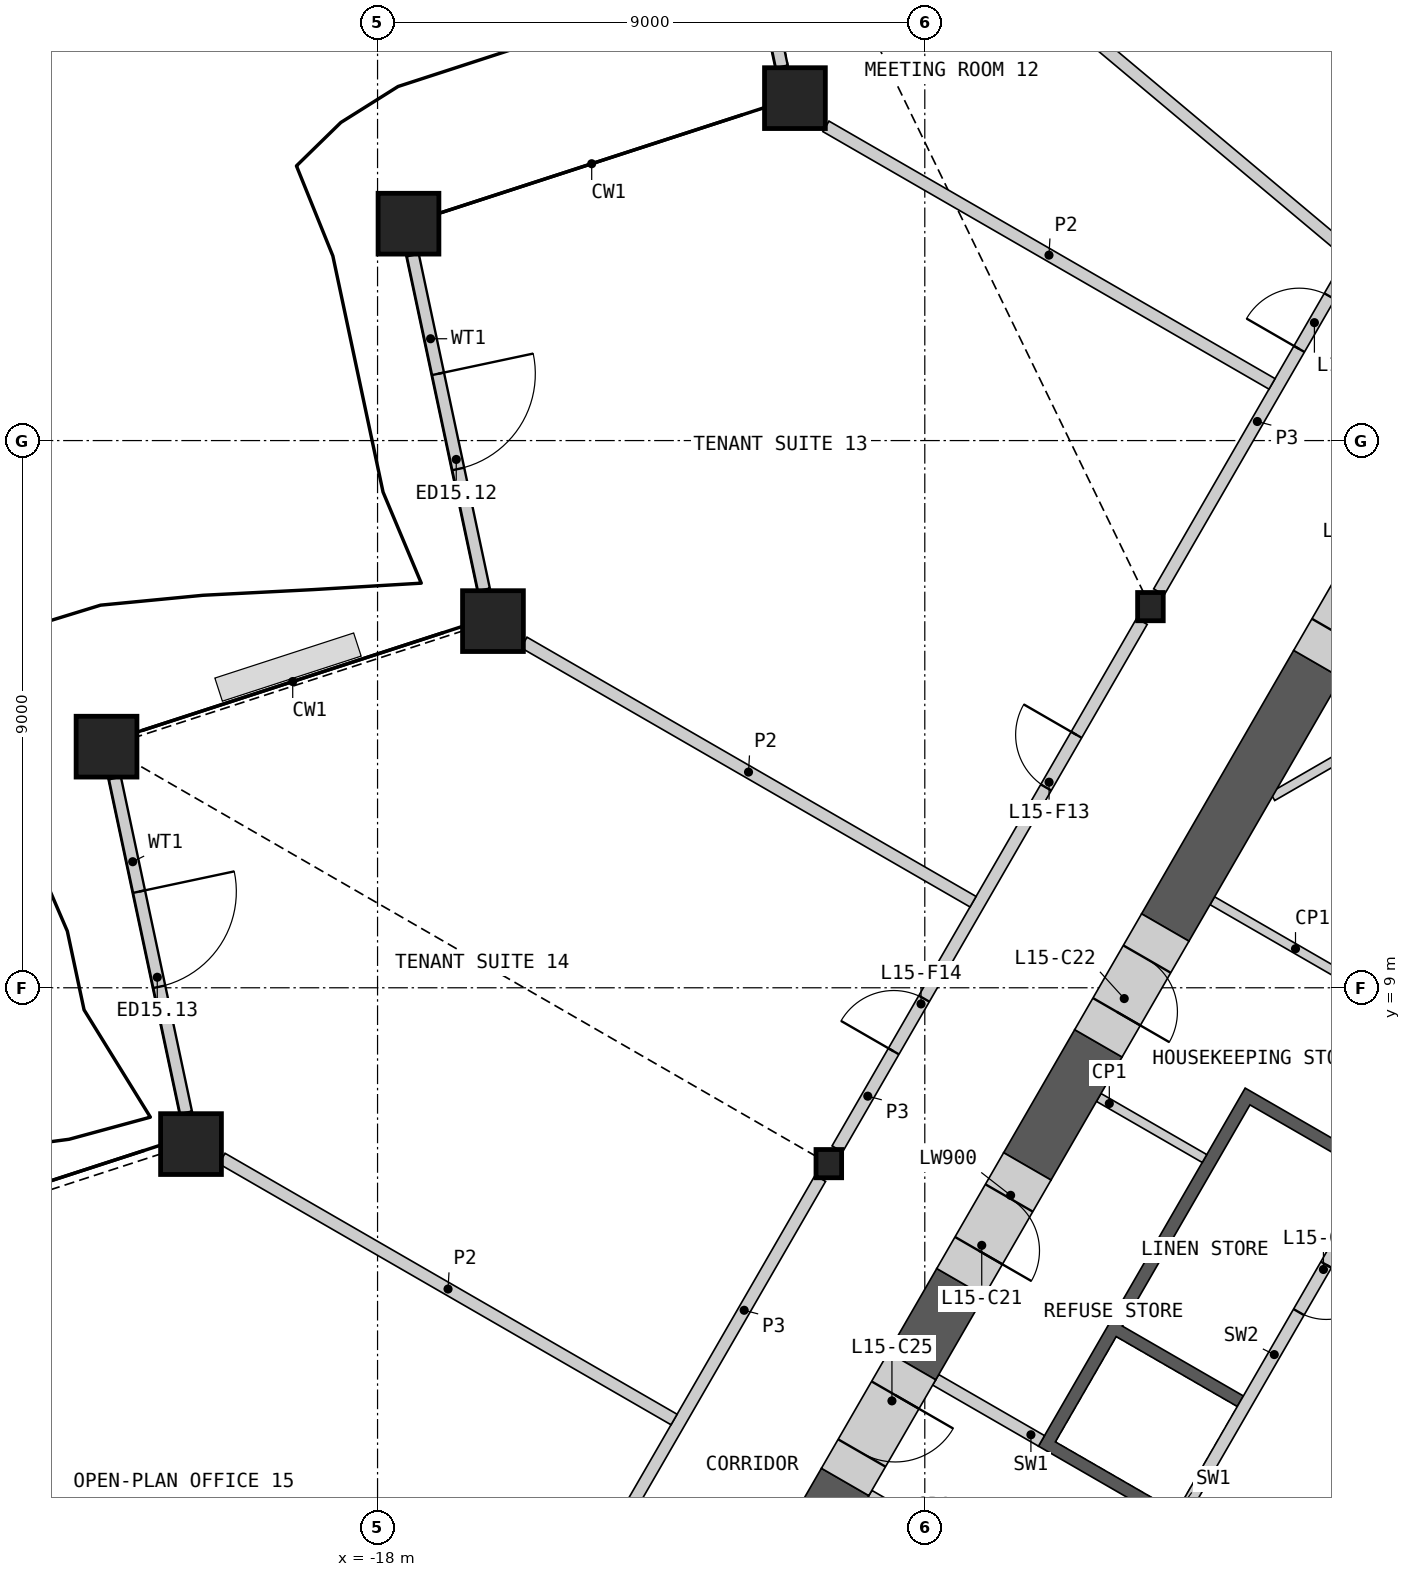
"""IFC4 building model, lengths in metres.
Left out: names, types, materials, properties, quantities, classifications, styles, units other than length and angle.
Written with IfcOpenShell. Run it as: python <this file> out.ifc"""

import sys

from ifc_helpers import new_model, si_unit, direction, frame, frame_2d, origin, origin_2d, place, context, subcontext, project, spatial, polyline, rectangle, hollow_rectangle, i_section, outline, extrude, element, fill, save


model = new_model("IFC4")
c1 = context("Model", 3, precision=1e-05, world=origin(), true_north=direction((0.0, 1.0)))
c2 = subcontext(c1, "Body", "Model", "MODEL_VIEW")
j1 = project(units=[si_unit("LENGTHUNIT", "METRE"), si_unit("PLANEANGLEUNIT", "RADIAN")], contexts=[c1])
p1 = place(None, origin())
s1 = spatial("IfcSite", under=j1, at=p1, CompositionType="ELEMENT")
p2 = place(p1, origin())
s2 = spatial("IfcBuilding", under=s1, at=p2, CompositionType="ELEMENT")
p3 = place(p2, frame((0.0, 0.0, 72.0)))
s3 = spatial("IfcBuildingStorey", under=s2, at=p3, CompositionType="ELEMENT", Elevation=72.0)
for number, where, z_axis, x_axis in (
    (1, (-11.136, 23.632, 0.0), (0.0, 0.0, 1.0), (1.0, 0.0, 0.0)),
    (2, (-17.491, 21.567, 0.0), (0.0, 0.0, 1.0), (1.0, 0.0, 0.0)),
    (3, (-16.102, 15.031, 0.0), (0.0, 0.0, 1.0), (1.0, 0.0, 0.0)),
    (4, (-22.457, 12.966, 0.0), (0.0, 0.0, 1.0), (1.0, 0.0, 0.0)),
    (5, (-21.068, 6.429, 0.0), (0.0, 0.0, 1.0), (1.0, 0.0, 0.0)),
):
    element("IfcColumn", number, at=place(p3, frame(where, z_axis=z_axis, x_axis=x_axis)), inside=s3, PredefinedType="COLUMN", context=c2, shape_type="SweptSolid", body=[
        extrude(hollow_rectangle(XDim=1.0, YDim=1.0, WallThickness=0.07, at=origin_2d()), origin(), (0.0, 0.0, 1.0), 4.2),
    ])
for number, where, z_axis, x_axis in (
    (6, (-5.289, 15.269, 0.0), (0.0, 0.0, 1.0), (1.0, 0.0, 0.0)),
    (7, (-10.578, 6.107, 0.0), (0.0, 0.0, 1.0), (1.0, 0.0, 0.0)),
):
    element("IfcColumn", number, at=place(p3, frame(where, z_axis=z_axis, x_axis=x_axis)), inside=s3, PredefinedType="COLUMN", context=c2, shape_type="SweptSolid", body=[
        extrude(i_section(OverallWidth=0.421, OverallDepth=0.465, WebThickness=0.045, FlangeThickness=0.072, at=origin_2d()), origin(), (0.0, 0.0, 1.0), 4.2),
    ])
p4 = place(p3, frame((-12.521, 29.652, 0.0), z_axis=(0.0, 0.0, 1.0), x_axis=(0.207901831982, -0.978149696242, 0.0)))
e8 = element("IfcWall", 8, at=p4, inside=s3, PredefinedType="SOLIDWALL", context=c2, shape_type="SweptSolid", body=[
    extrude(rectangle(XDim=5.626, YDim=0.2, at=frame_2d((2.813, 0.0))), origin(), (0.0, 0.0, 1.0), 3.189),
])
p5 = place(p4, frame((2.083, 0.0, 0.0)))
e9 = element("IfcOpeningElement", 9, at=p5, cuts=e8, PredefinedType="OPENING", context=c2, shape_type="SweptSolid", body=[
    extrude(rectangle(XDim=1.6, YDim=2.4, at=frame_2d((0.8, 1.2))), frame((0.0, 0.11, 0.0), z_axis=(0.0, -1.0, 0.0), x_axis=(1.0, 0.0, 0.0)), (0.0, 0.0, 1.0), 0.22),
])
p6 = place(p3, frame((-17.42, 21.051, 0.0), z_axis=(0.0, 0.0, 1.0), x_axis=(0.207901831982, -0.978149696242, 0.0)))
e10 = element("IfcWall", 10, at=p6, inside=s3, PredefinedType="SOLIDWALL", context=c2, shape_type="SweptSolid", body=[
    extrude(rectangle(XDim=5.626, YDim=0.2, at=frame_2d((2.813, 0.0))), origin(), (0.0, 0.0, 1.0), 3.189),
])
p7 = place(p6, frame((1.996, 0.0, 0.0)))
e11 = element("IfcOpeningElement", 11, at=p7, cuts=e10, PredefinedType="OPENING", context=c2, shape_type="SweptSolid", body=[
    extrude(rectangle(XDim=1.6, YDim=2.4, at=frame_2d((0.8, 1.2))), frame((0.0, 0.11, 0.0), z_axis=(0.0, -1.0, 0.0), x_axis=(1.0, 0.0, 0.0)), (0.0, 0.0, 1.0), 0.22),
])
p8 = place(p3, frame((-22.319, 12.449, 0.0), z_axis=(0.0, 0.0, 1.0), x_axis=(0.207901831982, -0.978149696242, 0.0)))
e12 = element("IfcWall", 12, at=p8, inside=s3, PredefinedType="SOLIDWALL", context=c2, shape_type="SweptSolid", body=[
    extrude(rectangle(XDim=5.626, YDim=0.2, at=frame_2d((2.813, 0.0))), origin(), (0.0, 0.0, 1.0), 3.189),
])
p9 = place(p8, frame((1.909, 0.0, 0.0)))
e13 = element("IfcOpeningElement", 13, at=p9, cuts=e12, PredefinedType="OPENING", context=c2, shape_type="SweptSolid", body=[
    extrude(rectangle(XDim=1.6, YDim=2.4, at=frame_2d((0.8, 1.2))), frame((0.0, 0.11, 0.0), z_axis=(0.0, -1.0, 0.0), x_axis=(1.0, 0.0, 0.0)), (0.0, 0.0, 1.0), 0.22),
])
p10 = place(p3, origin())
e14 = element("IfcWall", 14, at=p10, inside=s3, PredefinedType="SHEAR", context=c2, shape_type="SweptSolid", body=[
    extrude(outline(polyline([(-4.96, 0.208), (-7.131, 1.461), (-3.731, 7.35), (-1.561, 6.097), (-1.66, 5.924), (-3.652, 7.074), (-5.752, 3.437), (-3.76, 2.287), (-3.861, 2.113), (-5.852, 3.263), (-6.852, 1.531), (-4.861, 0.381), (-4.96, 0.208)])), origin(), (0.0, 0.0, 1.0), 3.8),
])
p11 = place(p3, frame((-1.631, 5.776, 0.0), z_axis=(0.0, 0.0, 1.0), x_axis=(-0.499992876559, -0.866029516466, 0.0)))
e15 = element("IfcWall", 15, at=p11, inside=s3, PredefinedType="SOLIDWALL", context=c2, shape_type="SweptSolid", body=[
    extrude(rectangle(XDim=6.486, YDim=0.2, at=frame_2d((3.243, 0.0))), origin(), (0.0, 0.0, 1.0), 3.8),
])
p12 = place(p11, frame((1.537, 0.0, 0.0)))
e16 = element("IfcOpeningElement", 16, at=p12, cuts=e15, PredefinedType="OPENING", context=c2, shape_type="SweptSolid", body=[
    extrude(rectangle(XDim=0.9, YDim=2.1, at=frame_2d((0.45, 1.05))), frame((0.0, 0.11, 0.0), z_axis=(0.0, -1.0, 0.0), x_axis=(1.0, 0.0, 0.0)), (0.0, 0.0, 1.0), 0.22),
])
p13 = place(p3, frame((-7.081, 1.548, 0.0), z_axis=(0.0, 0.0, 1.0), x_axis=(-0.865983199114, 0.50007309351, 0.0)))
e17 = element("IfcWall", 17, at=p13, inside=s3, PredefinedType="SHEAR", context=c2, shape_type="SweptSolid", body=[
    extrude(rectangle(XDim=2.009, YDim=0.2, at=frame_2d((1.004, 0.0))), origin(), (0.0, 0.0, 1.0), 3.8),
])
p14 = place(p3, frame((-8.181, -0.357, 0.0), z_axis=(0.0, 0.0, 1.0), x_axis=(-0.866035824272, 0.499981950752, 0.0)))
e18 = element("IfcWall", 18, at=p14, inside=s3, PredefinedType="SHEAR", context=c2, shape_type="SweptSolid", body=[
    extrude(rectangle(XDim=2.009, YDim=0.2, at=frame_2d((1.004, 0.0))), origin(), (0.0, 0.0, 1.0), 3.8),
])
p15 = place(p3, frame((-6.139, 7.196, 0.0), z_axis=(0.0, 0.0, 1.0), x_axis=(0.866035824272, -0.499981950752, 0.0)))
e19 = element("IfcWall", 19, at=p15, inside=s3, PredefinedType="PARTITIONING", context=c2, shape_type="SweptSolid", body=[
    extrude(rectangle(XDim=2.009, YDim=0.15, at=frame_2d((1.004, 0.0))), origin(), (0.0, 0.0, 1.0), 3.8),
])
p16 = place(p3, frame((-4.271, 10.432, 0.0), z_axis=(0.0, 0.0, 1.0), x_axis=(0.866018279777, -0.50001233894, 0.0)))
e20 = element("IfcWall", 20, at=p16, inside=s3, PredefinedType="PARTITIONING", context=c2, shape_type="SweptSolid", body=[
    extrude(rectangle(XDim=3.159, YDim=0.15, at=frame_2d((1.58, 0.0))), origin(), (0.0, 0.0, 1.0), 3.8),
])
p17 = place(p3, frame((1.641, 14.987, 0.0), z_axis=(0.0, 0.0, 1.0), x_axis=(-0.86602253128, -0.50000497529, 0.0)))
e21 = element("IfcWall", 21, at=p17, inside=s3, PredefinedType="PARTITIONING", context=c2, shape_type="SweptSolid", body=[
    extrude(rectangle(XDim=5.685, YDim=0.15, at=frame_2d((2.843, 0.0))), origin(), (0.0, 0.0, 1.0), 3.8),
])
p18 = place(p3, frame((-2.543, 14.325, 0.0), z_axis=(0.0, 0.0, 1.0), x_axis=(-0.500006859004, -0.866021443701, 0.0)))
e22 = element("IfcWall", 22, at=p18, inside=s3, PredefinedType="SHEAR", context=c2, shape_type="SweptSolid", body=[
    extrude(rectangle(XDim=5.003, YDim=0.9, at=frame_2d((2.502, 0.0))), origin(), (0.0, 0.0, 1.0), 3.8),
])
p19 = place(p3, frame((-10.31, 0.872, 0.0), z_axis=(0.0, 0.0, 1.0), x_axis=(-0.499946751862, -0.866056144429, 0.0)))
e23 = element("IfcWall", 23, at=p19, inside=s3, PredefinedType="SHEAR", context=c2, shape_type="SweptSolid", body=[
    extrude(rectangle(XDim=2.889, YDim=0.9, at=frame_2d((1.445, 0.0))), origin(), (0.0, 0.0, 1.0), 3.8),
])
p20 = place(p3, frame((-6.145, 8.086, 0.0), z_axis=(0.0, 0.0, 1.0), x_axis=(-0.500026924946, -0.866009858102, 0.0)))
e24 = element("IfcWall", 24, at=p20, inside=s3, PredefinedType="SHEAR", context=c2, shape_type="SweptSolid", body=[
    extrude(rectangle(XDim=2.337, YDim=0.9, at=frame_2d((1.168, 0.0))), origin(), (0.0, 0.0, 1.0), 3.8),
])
p21 = place(p3, frame((-8.413, 4.157, 0.0), z_axis=(0.0, 0.0, 1.0), x_axis=(-0.499961121316, -0.86604784924, 0.0)))
e25 = element("IfcWall", 25, at=p21, inside=s3, PredefinedType="SHEAR", context=c2, shape_type="SweptSolid", body=[
    extrude(rectangle(XDim=1.594, YDim=0.9, at=frame_2d((0.797, 0.0))), origin(), (0.0, 0.0, 1.0), 3.8),
])
p22 = place(p3, frame((-7.313, 6.062, 0.0), z_axis=(0.0, 0.0, 1.0), x_axis=(-0.500077893725, -0.86598042715, 0.0)))
e26 = element("IfcWall", 26, at=p22, inside=s3, PredefinedType="SHEAR", context=c2, shape_type="SweptSolid", body=[
    extrude(rectangle(XDim=2.2, YDim=0.9, at=frame_2d((1.1, 0.0))), origin(), (0.0, 0.0, 1.0), 3.8),
])
p23 = place(p22, frame((0.6, 0.0, 0.0)))
e27 = element("IfcOpeningElement", 27, at=p23, cuts=e26, PredefinedType="OPENING", context=c2, shape_type="SweptSolid", body=[
    extrude(rectangle(XDim=1.0, YDim=2.1, at=frame_2d((0.5, 1.05))), frame((0.0, 0.46, 0.0), z_axis=(0.0, -1.0, 0.0), x_axis=(1.0, 0.0, 0.0)), (0.0, 0.0, 1.0), 0.92),
])
p24 = place(p3, frame((-5.045, 9.992, 0.0), z_axis=(0.0, 0.0, 1.0), x_axis=(-0.499898558967, -0.866083962871, 0.0)))
e28 = element("IfcWall", 28, at=p24, inside=s3, PredefinedType="SHEAR", context=c2, shape_type="SweptSolid", body=[
    extrude(rectangle(XDim=2.2, YDim=0.9, at=frame_2d((1.1, 0.0))), origin(), (0.0, 0.0, 1.0), 3.8),
])
p25 = place(p24, frame((0.6, 0.0, 0.0)))
e29 = element("IfcOpeningElement", 29, at=p25, cuts=e28, PredefinedType="OPENING", context=c2, shape_type="SweptSolid", body=[
    extrude(rectangle(XDim=1.0, YDim=2.1, at=frame_2d((0.5, 1.05))), frame((0.0, 0.46, 0.0), z_axis=(0.0, -1.0, 0.0), x_axis=(1.0, 0.0, 0.0)), (0.0, 0.0, 1.0), 0.92),
])
p26 = place(p3, frame((-1.443, 16.23, 0.0), z_axis=(0.0, 0.0, 1.0), x_axis=(-0.50002983664, -0.866008176907, 0.0)))
e30 = element("IfcWall", 30, at=p26, inside=s3, PredefinedType="SHEAR", context=c2, shape_type="SweptSolid", body=[
    extrude(rectangle(XDim=2.2, YDim=0.9, at=frame_2d((1.1, 0.0))), origin(), (0.0, 0.0, 1.0), 3.8),
])
p27 = place(p26, frame((0.6, 0.0, 0.0)))
e31 = element("IfcOpeningElement", 31, at=p27, cuts=e30, PredefinedType="OPENING", context=c2, shape_type="SweptSolid", body=[
    extrude(rectangle(XDim=1.0, YDim=2.1, at=frame_2d((0.5, 1.05))), frame((0.0, 0.46, 0.0), z_axis=(0.0, -1.0, 0.0), x_axis=(1.0, 0.0, 0.0)), (0.0, 0.0, 1.0), 0.92),
])
p28 = place(p3, frame((-9.21, 2.777, 0.0), z_axis=(0.0, 0.0, 1.0), x_axis=(-0.500077893725, -0.86598042715, 0.0)))
e32 = element("IfcWall", 32, at=p28, inside=s3, PredefinedType="SHEAR", context=c2, shape_type="SweptSolid", body=[
    extrude(rectangle(XDim=2.2, YDim=0.9, at=frame_2d((1.1, 0.0))), origin(), (0.0, 0.0, 1.0), 3.8),
])
p29 = place(p28, frame((0.55, 0.0, 0.0)))
e33 = element("IfcOpeningElement", 33, at=p29, cuts=e32, PredefinedType="OPENING", context=c2, shape_type="SweptSolid", body=[
    extrude(rectangle(XDim=1.1, YDim=2.1, at=frame_2d((0.55, 1.05))), frame((0.0, 0.46, 0.0), z_axis=(0.0, -1.0, 0.0), x_axis=(1.0, 0.0, 0.0)), (0.0, 0.0, 1.0), 0.92),
])
p30 = place(p3, frame((-15.728, -2.811, 0.0), z_axis=(0.0, 0.0, 1.0), x_axis=(0.49999175339, 0.866030164915, 0.0)))
e34 = element("IfcWall", 34, at=p30, inside=s3, PredefinedType="PARTITIONING", context=c2, shape_type="SweptSolid", body=[
    extrude(rectangle(XDim=10.019, YDim=0.2, at=frame_2d((5.009, 0.0))), origin(), (0.0, 0.0, 1.0), 3.8),
])
p31 = place(p30, frame((2.154, 0.0, 0.0)))
e35 = element("IfcOpeningElement", 35, at=p31, cuts=e34, PredefinedType="OPENING", context=c2, shape_type="SweptSolid", body=[
    extrude(rectangle(XDim=1.0, YDim=2.1, at=frame_2d((0.5, 1.05))), frame((0.0, 0.11, 0.0), z_axis=(0.0, -1.0, 0.0), x_axis=(1.0, 0.0, 0.0)), (0.0, 0.0, 1.0), 0.22),
])
p32 = place(p3, frame((-10.439, 6.35, 0.0), z_axis=(0.0, 0.0, 1.0), x_axis=(0.50001002959, 0.86601961312, 0.0)))
e36 = element("IfcWall", 36, at=p32, inside=s3, PredefinedType="PARTITIONING", context=c2, shape_type="SweptSolid", body=[
    extrude(rectangle(XDim=10.019, YDim=0.2, at=frame_2d((5.009, 0.0))), origin(), (0.0, 0.0, 1.0), 3.8),
])
p33 = place(p32, frame((6.865, 0.0, 0.0)))
e37 = element("IfcOpeningElement", 37, at=p33, cuts=e36, PredefinedType="OPENING", context=c2, shape_type="SweptSolid", body=[
    extrude(rectangle(XDim=1.0, YDim=2.1, at=frame_2d((0.5, 1.05))), frame((0.0, 0.11, 0.0), z_axis=(0.0, -1.0, 0.0), x_axis=(1.0, 0.0, 0.0)), (0.0, 0.0, 1.0), 0.22),
])
p34 = place(p32, frame((1.854, 0.0, 0.0)))
e38 = element("IfcOpeningElement", 38, at=p34, cuts=e36, PredefinedType="OPENING", context=c2, shape_type="SweptSolid", body=[
    extrude(rectangle(XDim=1.0, YDim=2.1, at=frame_2d((0.5, 1.05))), frame((0.0, 0.11, 0.0), z_axis=(0.0, -1.0, 0.0), x_axis=(1.0, 0.0, 0.0)), (0.0, 0.0, 1.0), 0.22),
])
p35 = place(p3, frame((-5.149, 15.511, 0.0), z_axis=(0.0, 0.0, 1.0), x_axis=(0.500001069878, 0.866024786089, 0.0)))
e39 = element("IfcWall", 39, at=p35, inside=s3, PredefinedType="PARTITIONING", context=c2, shape_type="SweptSolid", body=[
    extrude(rectangle(XDim=6.473, YDim=0.2, at=frame_2d((3.236, 0.0))), origin(), (0.0, 0.0, 1.0), 3.8),
])
p36 = place(p35, frame((4.614, 0.0, 0.0)))
e40 = element("IfcOpeningElement", 40, at=p36, cuts=e39, PredefinedType="OPENING", context=c2, shape_type="SweptSolid", body=[
    extrude(rectangle(XDim=1.0, YDim=2.1, at=frame_2d((0.5, 1.05))), frame((0.0, 0.11, 0.0), z_axis=(0.0, -1.0, 0.0), x_axis=(1.0, 0.0, 0.0)), (0.0, 0.0, 1.0), 0.22),
])
p37 = place(p3, frame((-12.257, 29.659, 0.0), z_axis=(0.0, 0.0, 1.0), x_axis=(0.766370381447, -0.642398971388, 0.0)))
e41 = element("IfcWall", 41, at=p37, inside=s3, PredefinedType="PARTITIONING", context=c2, shape_type="SweptSolid", body=[
    extrude(rectangle(XDim=13.332, YDim=0.2, at=frame_2d((6.666, 0.0))), origin(), (0.0, 0.0, 1.0), 2.885),
])
p38 = place(p3, frame((-20.558, 6.191, 0.0), z_axis=(0.0, 0.0, 1.0), x_axis=(0.866024086673, -0.500002281298, 0.0)))
e42 = element("IfcWall", 42, at=p38, inside=s3, PredefinedType="PARTITIONING", context=c2, shape_type="SweptSolid", body=[
    extrude(rectangle(XDim=8.584, YDim=0.2, at=frame_2d((4.292, 0.0))), origin(), (0.0, 0.0, 1.0), 2.885),
])
p39 = place(p3, frame((-15.592, 14.68, 0.0), z_axis=(0.0, 0.0, 1.0), x_axis=(0.866023490266, -0.500003314297, 0.0)))
e43 = element("IfcWall", 43, at=p39, inside=s3, PredefinedType="PARTITIONING", context=c2, shape_type="SweptSolid", body=[
    extrude(rectangle(XDim=8.528, YDim=0.2, at=frame_2d((4.264, 0.0))), origin(), (0.0, 0.0, 1.0), 2.885),
])
p40 = place(p3, frame((-10.626, 23.168, 0.0), z_axis=(0.0, 0.0, 1.0), x_axis=(0.866022885879, -0.500004361114, 0.0)))
e44 = element("IfcWall", 44, at=p40, inside=s3, PredefinedType="PARTITIONING", context=c2, shape_type="SweptSolid", body=[
    extrude(rectangle(XDim=8.471, YDim=0.2, at=frame_2d((4.236, 0.0))), origin(), (0.0, 0.0, 1.0), 2.885),
])
p41 = place(p7, origin())
e45 = element("IfcDoor", 45, at=p41, inside=s3, OperationType="DOUBLE_DOOR_SINGLE_SWING", PredefinedType="DOOR", context=c2, shape_type="SweptSolid", body=[
    extrude(rectangle(XDim=1.6, YDim=2.4, at=frame_2d((0.8, 1.2))), frame((0.0, 0.025, 0.0), z_axis=(0.0, -1.0, 0.0), x_axis=(1.0, 0.0, 0.0)), (0.0, 0.0, 1.0), 0.05),
])
fill(e11, e45)
p42 = place(p9, origin())
e46 = element("IfcDoor", 46, at=p42, inside=s3, OperationType="DOUBLE_DOOR_SINGLE_SWING", PredefinedType="DOOR", context=c2, shape_type="SweptSolid", body=[
    extrude(rectangle(XDim=1.6, YDim=2.4, at=frame_2d((0.8, 1.2))), frame((0.0, 0.025, 0.0), z_axis=(0.0, -1.0, 0.0), x_axis=(1.0, 0.0, 0.0)), (0.0, 0.0, 1.0), 0.05),
])
fill(e13, e46)
p43 = place(p12, origin())
e47 = element("IfcDoor", 47, at=p43, inside=s3, OperationType="SINGLE_SWING_LEFT", PredefinedType="DOOR", context=c2, shape_type="SweptSolid", body=[
    extrude(rectangle(XDim=0.9, YDim=2.1, at=frame_2d((0.45, 1.05))), frame((0.0, 0.025, 0.0), z_axis=(0.0, -1.0, 0.0), x_axis=(1.0, 0.0, 0.0)), (0.0, 0.0, 1.0), 0.05),
])
fill(e16, e47)
p44 = place(p23, origin())
e48 = element("IfcDoor", 48, at=p44, inside=s3, OperationType="SINGLE_SWING_RIGHT", PredefinedType="DOOR", context=c2, shape_type="SweptSolid", body=[
    extrude(rectangle(XDim=1.0, YDim=2.1, at=frame_2d((0.5, 1.05))), frame((0.0, 0.205, 0.0), z_axis=(0.0, -1.0, 0.0), x_axis=(1.0, 0.0, 0.0)), (0.0, 0.0, 1.0), 0.05),
])
fill(e27, e48)
p45 = place(p25, origin())
e49 = element("IfcDoor", 49, at=p45, inside=s3, OperationType="SINGLE_SWING_RIGHT", PredefinedType="DOOR", context=c2, shape_type="SweptSolid", body=[
    extrude(rectangle(XDim=1.0, YDim=2.1, at=frame_2d((0.5, 1.05))), frame((0.0, 0.205, 0.0), z_axis=(0.0, -1.0, 0.0), x_axis=(1.0, 0.0, 0.0)), (0.0, 0.0, 1.0), 0.05),
])
fill(e29, e49)
p46 = place(p29, origin())
e50 = element("IfcDoor", 50, at=p46, inside=s3, OperationType="SINGLE_SWING_LEFT", PredefinedType="DOOR", context=c2, shape_type="SweptSolid", body=[
    extrude(rectangle(XDim=1.1, YDim=2.1, at=frame_2d((0.55, 1.05))), frame((0.0, 0.205, 0.0), z_axis=(0.0, -1.0, 0.0), x_axis=(1.0, 0.0, 0.0)), (0.0, 0.0, 1.0), 0.05),
])
fill(e33, e50)
p47 = place(p36, origin())
e51 = element("IfcDoor", 51, at=p47, inside=s3, OperationType="SINGLE_SWING_LEFT", PredefinedType="DOOR", context=c2, shape_type="SweptSolid", body=[
    extrude(rectangle(XDim=1.0, YDim=2.1, at=frame_2d((0.5, 1.05))), frame((0.0, 0.025, 0.0), z_axis=(0.0, -1.0, 0.0), x_axis=(1.0, 0.0, 0.0)), (0.0, 0.0, 1.0), 0.05),
])
fill(e40, e51)
p48 = place(p33, origin())
e52 = element("IfcDoor", 52, at=p48, inside=s3, OperationType="SINGLE_SWING_RIGHT", PredefinedType="DOOR", context=c2, shape_type="SweptSolid", body=[
    extrude(rectangle(XDim=1.0, YDim=2.1, at=frame_2d((0.5, 1.05))), frame((0.0, 0.025, 0.0), z_axis=(0.0, -1.0, 0.0), x_axis=(1.0, 0.0, 0.0)), (0.0, 0.0, 1.0), 0.05),
])
fill(e37, e52)
p49 = place(p34, origin())
e53 = element("IfcDoor", 53, at=p49, inside=s3, OperationType="SINGLE_SWING_LEFT", PredefinedType="DOOR", context=c2, shape_type="SweptSolid", body=[
    extrude(rectangle(XDim=1.0, YDim=2.1, at=frame_2d((0.5, 1.05))), frame((0.0, 0.025, 0.0), z_axis=(0.0, -1.0, 0.0), x_axis=(1.0, 0.0, 0.0)), (0.0, 0.0, 1.0), 0.05),
])
fill(e38, e53)
save(model, sys.argv[1])
